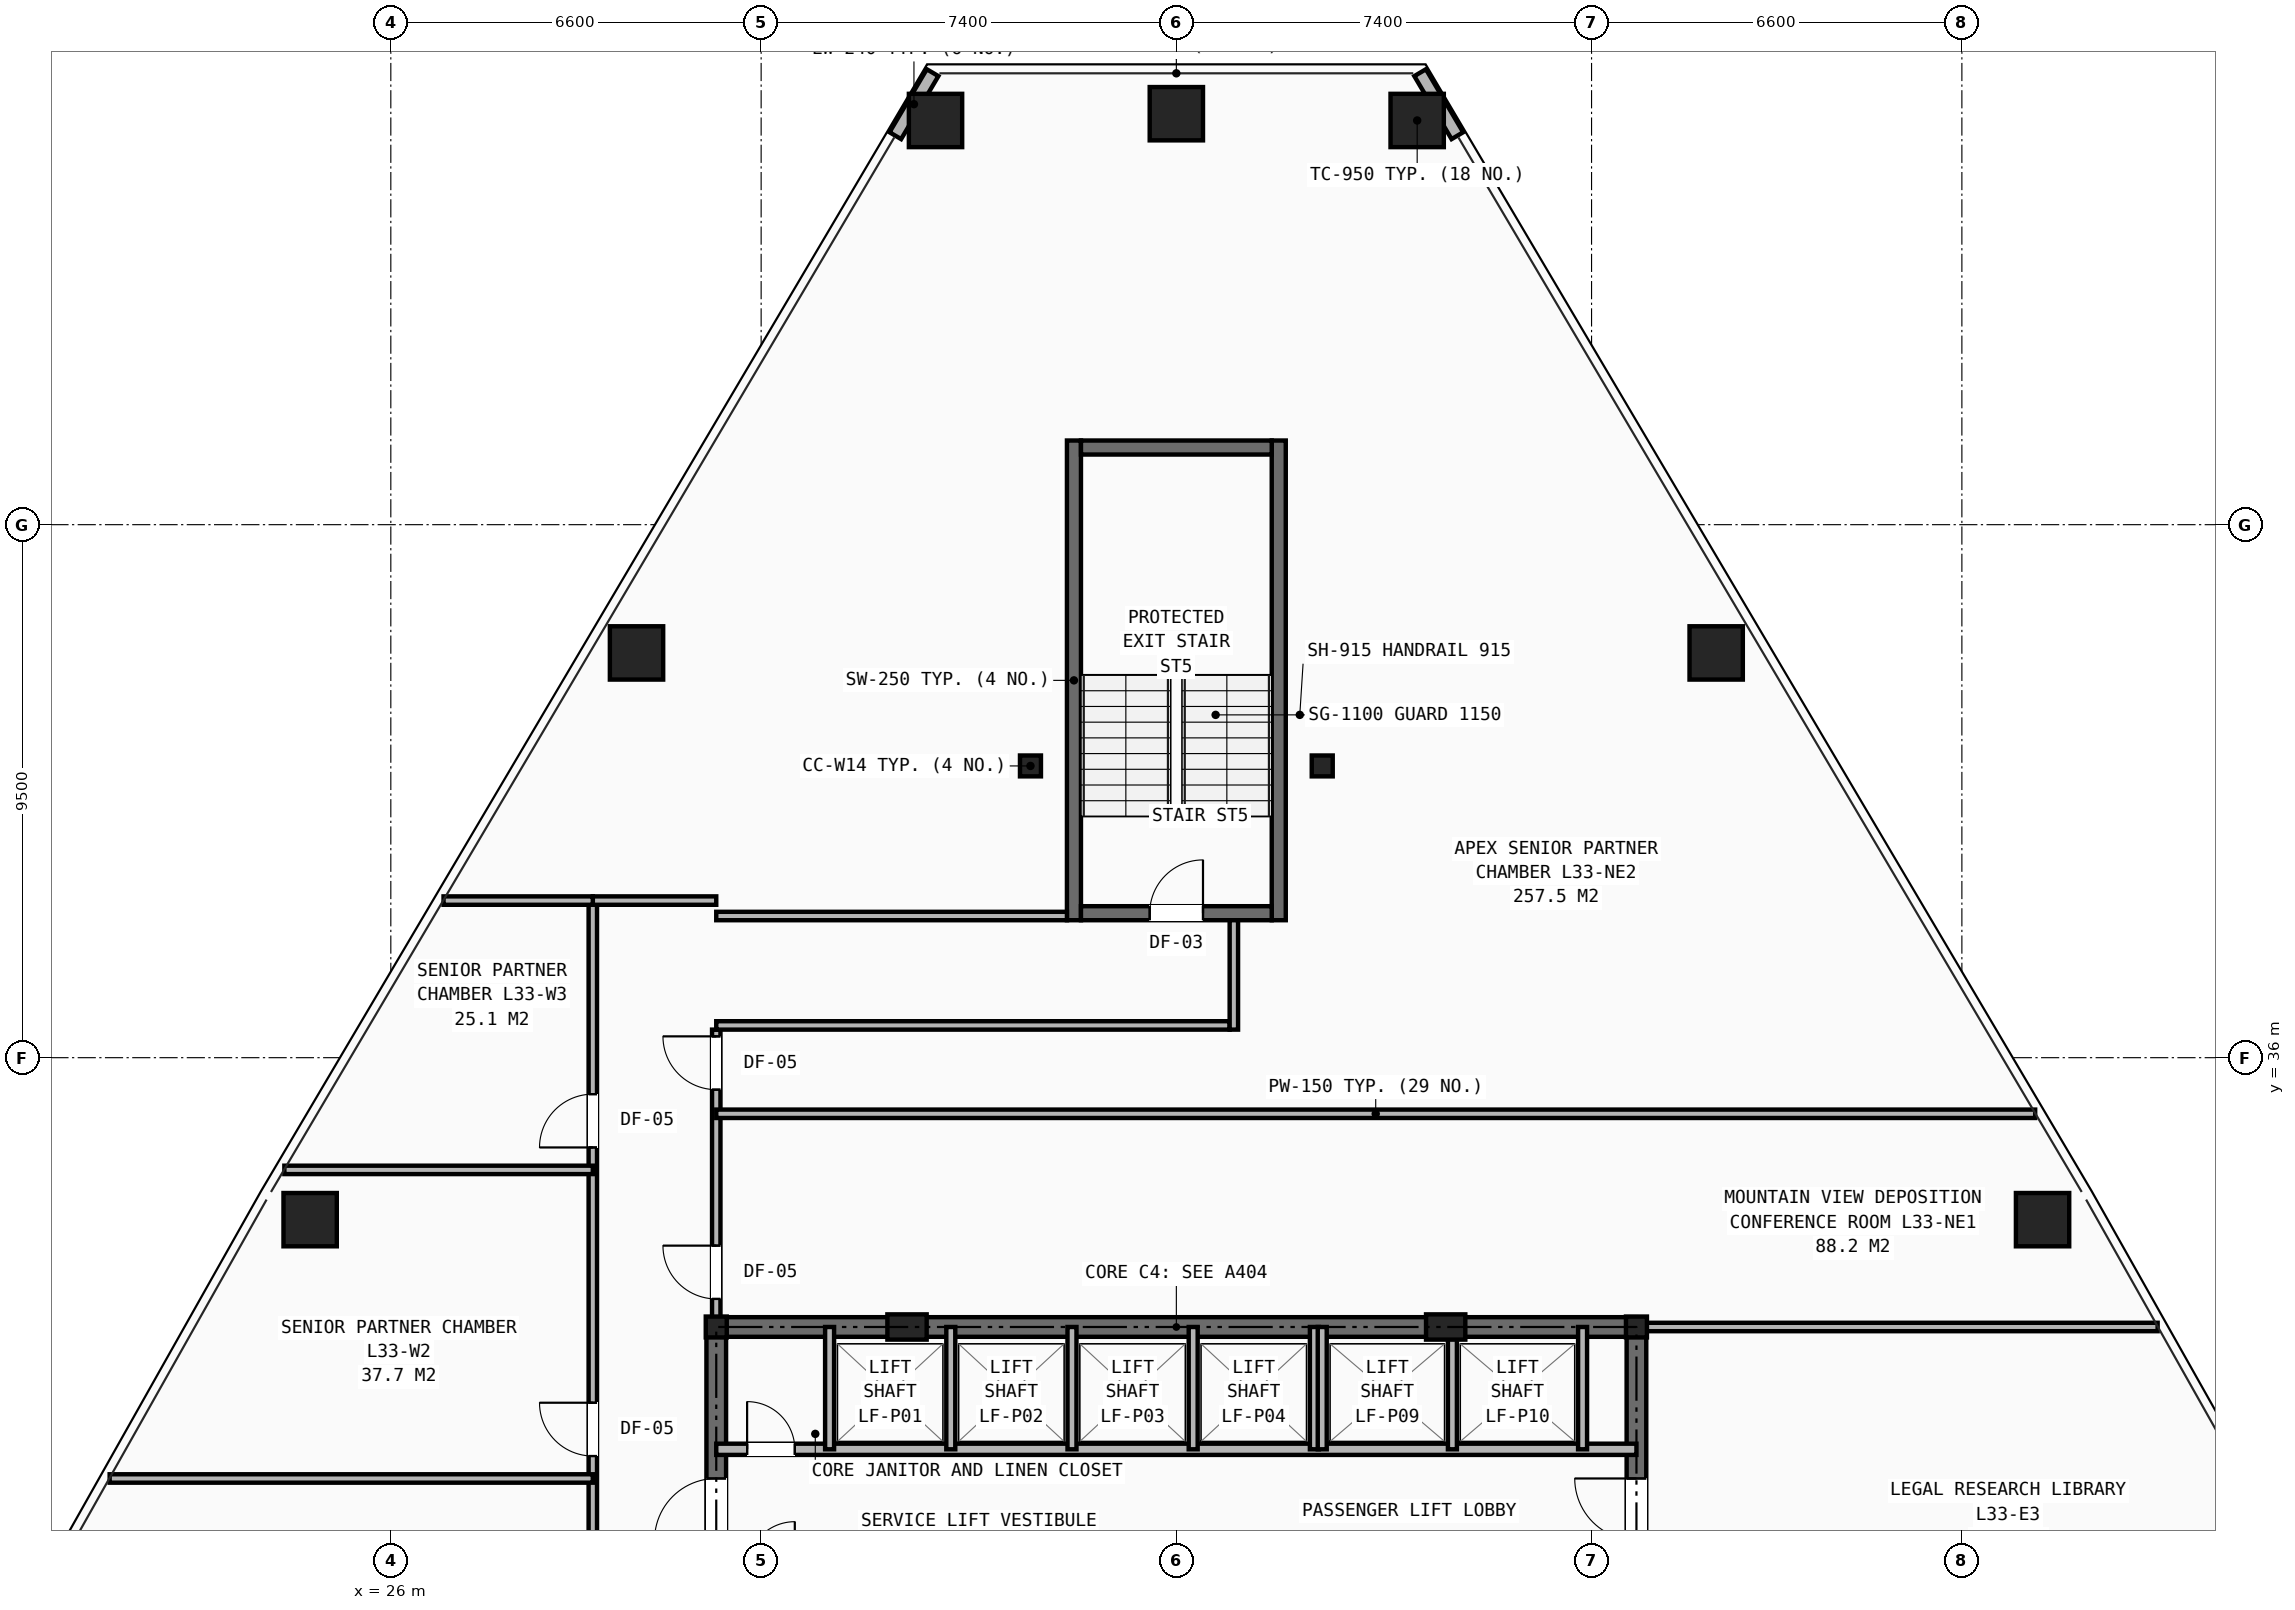
"""IFC4 building model, lengths in metres.
Left out: names, types, materials, properties, quantities, classifications, styles, units other than length and angle.
Written with IfcOpenShell. Run it as: python <this file> out.ifc"""

import sys

from ifc_helpers import new_model, si_unit, direction, frame, frame_2d, origin, origin_2d, place, context, subcontext, project, spatial, rectangle, hollow_rectangle, i_section, extrude, element, fill, save


model = new_model("IFC4")
c1 = context("Model", 3, precision=1e-05, world=origin(), true_north=direction((0.0, 1.0)))
c2 = subcontext(c1, "Body", "Model", "MODEL_VIEW")
j1 = project(units=[si_unit("LENGTHUNIT", "METRE"), si_unit("PLANEANGLEUNIT", "RADIAN")], contexts=[c1])
p1 = place(None, origin())
s1 = spatial("IfcSite", under=j1, at=p1, CompositionType="ELEMENT")
p2 = place(p1, origin())
s2 = spatial("IfcBuilding", under=s1, at=p2, CompositionType="ELEMENT")
p3 = place(p2, frame((0.0, 0.0, 116.0)))
s3 = spatial("IfcBuildingStorey", under=s2, at=p3, CompositionType="ELEMENT", Elevation=116.0)
for number, where, z_axis, x_axis in (
    (1, (31.8, 31.2, 0.0), (0.0, 0.0, 1.0), (1.0, 0.0, 0.0)),
    (2, (48.2, 31.2, 0.0), (0.0, 0.0, 1.0), (1.0, 0.0, 0.0)),
    (3, (37.4, 41.2, 0.0), (0.0, 0.0, 1.0), (1.0, 0.0, 0.0)),
    (4, (42.6, 41.2, 0.0), (0.0, 0.0, 1.0), (1.0, 0.0, 0.0)),
):
    element("IfcColumn", number, at=place(p3, frame(where, z_axis=z_axis, x_axis=x_axis)), inside=s3, PredefinedType="COLUMN", context=c2, shape_type="SweptSolid", body=[
        extrude(i_section(OverallWidth=0.374, OverallDepth=0.372, WebThickness=0.016, FlangeThickness=0.026, at=origin_2d()), origin(), (0.0, 0.0, 1.0), 3.45),
    ])
for number, where, z_axis, x_axis in (
    (5, (35.2, 31.2, 0.0), (0.0, 0.0, 1.0), (1.0, 0.0, 0.0)),
    (6, (44.8, 31.2, 0.0), (0.0, 0.0, 1.0), (1.0, 0.0, 0.0)),
):
    element("IfcColumn", number, at=place(p3, frame(where, z_axis=z_axis, x_axis=x_axis)), inside=s3, PredefinedType="PILASTER", context=c2, shape_type="SweptSolid", body=[
        extrude(rectangle(XDim=0.7, YDim=0.45, at=origin_2d()), origin(), (0.0, 0.0, 1.0), 3.45),
    ])
for number, where, z_axis, x_axis in (
    (7, (44.292, 52.704, 0.0), (0.0, 0.0, 1.0), (1.0, 0.0, 0.0)),
    (8, (40.0, 52.825, 0.0), (0.0, 0.0, 1.0), (1.0, 0.0, 0.0)),
    (9, (35.708, 52.704, 0.0), (0.0, 0.0, 1.0), (1.0, 0.0, 0.0)),
    (10, (30.379, 43.214, 0.0), (0.0, 0.0, 1.0), (1.0, 0.0, 0.0)),
    (11, (24.562, 33.113, 0.0), (0.0, 0.0, 1.0), (1.0, 0.0, 0.0)),
    (12, (55.438, 33.113, 0.0), (0.0, 0.0, 1.0), (1.0, 0.0, 0.0)),
    (13, (49.621, 43.214, 0.0), (0.0, 0.0, 1.0), (1.0, 0.0, 0.0)),
):
    element("IfcColumn", number, at=place(p3, frame(where, z_axis=z_axis, x_axis=x_axis)), inside=s3, PredefinedType="COLUMN", context=c2, shape_type="SweptSolid", body=[
        extrude(hollow_rectangle(XDim=0.95, YDim=0.95, WallThickness=0.065, at=origin_2d()), origin(), (0.0, 0.0, 1.0), 3.45),
    ])
for number, where, z_axis, x_axis in (
    (14, (35.655, 53.556, 0.0), (0.0, 0.0, 1.0), (-0.509, -0.861, 0.0)),
    (15, (45.009, 52.433, 0.0), (0.0, 0.0, 1.0), (-0.509, 0.861, 0.0)),
):
    element("IfcWall", number, at=place(p3, frame(where, z_axis=z_axis, x_axis=x_axis)), inside=s3, PredefinedType="SHEAR", context=c2, shape_type="SweptSolid", body=[
        extrude(rectangle(XDim=1.304, YDim=0.24, at=frame_2d((0.652, 0.0))), origin(), (0.0, 0.0, 1.0), 2.583),
    ])
p4 = place(p3, frame((31.8, 31.2, 0.0), z_axis=(0.0, 0.0, 1.0), x_axis=(1.0, 0.0, 0.0)))
e16 = element("IfcWall", 16, at=p4, inside=s3, PredefinedType="SHEAR", context=c2, shape_type="SweptSolid", body=[
    extrude(rectangle(XDim=16.4, YDim=0.35, at=frame_2d((8.2, 0.0))), origin(), (0.0, 0.0, 1.0), 3.21),
])
p5 = place(p3, frame((31.8, 16.4, 0.0), z_axis=(0.0, 0.0, 1.0), x_axis=(0.0, 1.0, 0.0)))
e17 = element("IfcWall", 17, at=p5, inside=s3, PredefinedType="SHEAR", context=c2, shape_type="SweptSolid", body=[
    extrude(rectangle(XDim=14.8, YDim=0.35, at=frame_2d((7.4, 0.0))), origin(), (0.0, 0.0, 1.0), 3.21),
])
p6 = place(p5, frame((11.0, 0.0, 0.0)))
e18 = element("IfcOpeningElement", 18, at=p6, cuts=e17, PredefinedType="OPENING", context=c2, shape_type="SweptSolid", body=[
    extrude(rectangle(XDim=1.1, YDim=2.15, at=frame_2d((0.55, 1.075))), frame((0.0, 0.185, 0.0), z_axis=(0.0, -1.0, 0.0), x_axis=(1.0, 0.0, 0.0)), (0.0, 0.0, 1.0), 0.37),
])
p7 = place(p3, frame((48.2, 16.4, 0.0), z_axis=(0.0, 0.0, 1.0), x_axis=(0.0, 1.0, 0.0)))
e19 = element("IfcWall", 19, at=p7, inside=s3, PredefinedType="SHEAR", context=c2, shape_type="SweptSolid", body=[
    extrude(rectangle(XDim=14.8, YDim=0.35, at=frame_2d((7.4, 0.0))), origin(), (0.0, 0.0, 1.0), 3.21),
])
p8 = place(p7, frame((11.0, 0.0, 0.0)))
e20 = element("IfcOpeningElement", 20, at=p8, cuts=e19, PredefinedType="OPENING", context=c2, shape_type="SweptSolid", body=[
    extrude(rectangle(XDim=1.1, YDim=2.15, at=frame_2d((0.55, 1.075))), frame((0.0, 0.185, 0.0), z_axis=(0.0, -1.0, 0.0), x_axis=(1.0, 0.0, 0.0)), (0.0, 0.0, 1.0), 0.37),
])
p9 = place(p3, frame((31.8, 29.02, 0.0), z_axis=(0.0, 0.0, 1.0), x_axis=(1.0, 0.0, 0.0)))
e21 = element("IfcWall", 21, at=p9, inside=s3, PredefinedType="SOLIDWALL", context=c2, shape_type="SweptSolid", body=[
    extrude(rectangle(XDim=16.4, YDim=0.2, at=frame_2d((8.2, 0.0))), origin(), (0.0, 0.0, 1.0), 2.661),
])
p10 = place(p9, frame((0.55, 0.0, 0.0)))
e22 = element("IfcOpeningElement", 22, at=p10, cuts=e21, PredefinedType="OPENING", context=c2, shape_type="SweptSolid", body=[
    extrude(rectangle(XDim=0.85, YDim=2.05, at=frame_2d((0.425, 1.025))), frame((0.0, 0.11, 0.0), z_axis=(0.0, -1.0, 0.0), x_axis=(1.0, 0.0, 0.0)), (0.0, 0.0, 1.0), 0.22),
])
for number, where, z_axis, x_axis in (
    (23, (33.82, 29.02, 0.0), (0.0, 0.0, 1.0), (0.0, 1.0, 0.0)),
    (24, (35.98, 29.02, 0.0), (0.0, 0.0, 1.0), (0.0, 1.0, 0.0)),
    (25, (38.14, 29.02, 0.0), (0.0, 0.0, 1.0), (0.0, 1.0, 0.0)),
    (26, (40.3, 29.02, 0.0), (0.0, 0.0, 1.0), (0.0, 1.0, 0.0)),
    (27, (42.46, 29.02, 0.0), (0.0, 0.0, 1.0), (0.0, 1.0, 0.0)),
    (28, (42.6, 29.02, 0.0), (0.0, 0.0, 1.0), (0.0, 1.0, 0.0)),
    (29, (44.92, 29.02, 0.0), (0.0, 0.0, 1.0), (0.0, 1.0, 0.0)),
    (30, (47.24, 29.02, 0.0), (0.0, 0.0, 1.0), (0.0, 1.0, 0.0)),
):
    element("IfcWall", number, at=place(p3, frame(where, z_axis=z_axis, x_axis=x_axis)), inside=s3, PredefinedType="SOLIDWALL", context=c2, shape_type="SweptSolid", body=[
        extrude(rectangle(XDim=2.18, YDim=0.16, at=frame_2d((1.09, 0.0))), origin(), (0.0, 0.0, 1.0), 2.661),
    ])
p11 = place(p3, frame((29.6, 24.9, 0.0), z_axis=(0.0, 0.0, 1.0), x_axis=(0.0, 1.0, 0.0)))
e31 = element("IfcWall", 31, at=p11, inside=s3, PredefinedType="PARTITIONING", context=c2, shape_type="SweptSolid", body=[
    extrude(rectangle(XDim=13.9, YDim=0.15, at=frame_2d((6.95, 0.0))), origin(), (0.0, 0.0, 1.0), 2.225),
])
p12 = place(p11, frame((0.4, 0.0, 0.0)))
e32 = element("IfcOpeningElement", 32, at=p12, cuts=e31, PredefinedType="OPENING", context=c2, shape_type="SweptSolid", body=[
    extrude(rectangle(XDim=0.95, YDim=2.1, at=frame_2d((0.475, 1.05))), frame((0.0, 0.085, 0.0), z_axis=(0.0, -1.0, 0.0), x_axis=(1.0, 0.0, 0.0)), (0.0, 0.0, 1.0), 0.17),
])
p13 = place(p11, frame((4.0, 0.0, 0.0)))
e33 = element("IfcOpeningElement", 33, at=p13, cuts=e31, PredefinedType="OPENING", context=c2, shape_type="SweptSolid", body=[
    extrude(rectangle(XDim=0.95, YDim=2.1, at=frame_2d((0.475, 1.05))), frame((0.0, 0.085, 0.0), z_axis=(0.0, -1.0, 0.0), x_axis=(1.0, 0.0, 0.0)), (0.0, 0.0, 1.0), 0.17),
])
p14 = place(p11, frame((9.5, 0.0, 0.0)))
e34 = element("IfcOpeningElement", 34, at=p14, cuts=e31, PredefinedType="OPENING", context=c2, shape_type="SweptSolid", body=[
    extrude(rectangle(XDim=0.95, YDim=2.1, at=frame_2d((0.475, 1.05))), frame((0.0, 0.085, 0.0), z_axis=(0.0, -1.0, 0.0), x_axis=(1.0, 0.0, 0.0)), (0.0, 0.0, 1.0), 0.17),
])
p15 = place(p3, frame((31.8, 31.2, 0.0), z_axis=(0.0, 0.0, 1.0), x_axis=(0.0, 1.0, 0.0)))
e35 = element("IfcWall", 35, at=p15, inside=s3, PredefinedType="PARTITIONING", context=c2, shape_type="SweptSolid", body=[
    extrude(rectangle(XDim=5.3, YDim=0.15, at=frame_2d((2.65, 0.0))), origin(), (0.0, 0.0, 1.0), 2.225),
])
p16 = place(p15, frame((0.5, 0.0, 0.0)))
e36 = element("IfcOpeningElement", 36, at=p16, cuts=e35, PredefinedType="OPENING", context=c2, shape_type="SweptSolid", body=[
    extrude(rectangle(XDim=0.95, YDim=2.1, at=frame_2d((0.475, 1.05))), frame((0.0, 0.085, 0.0), z_axis=(0.0, -1.0, 0.0), x_axis=(1.0, 0.0, 0.0)), (0.0, 0.0, 1.0), 0.17),
])
p17 = place(p15, frame((4.23, 0.0, 0.0)))
e37 = element("IfcOpeningElement", 37, at=p17, cuts=e35, PredefinedType="OPENING", context=c2, shape_type="SweptSolid", body=[
    extrude(rectangle(XDim=0.95, YDim=2.1, at=frame_2d((0.475, 1.05))), frame((0.0, 0.085, 0.0), z_axis=(0.0, -1.0, 0.0), x_axis=(1.0, 0.0, 0.0)), (0.0, 0.0, 1.0), 0.17),
])
p18 = place(p3, frame((29.6, 38.8, 0.0), z_axis=(0.0, 0.0, 1.0), x_axis=(1.0, 0.0, 0.0)))
e38 = element("IfcWall", 38, at=p18, inside=s3, PredefinedType="PARTITIONING", context=c2, shape_type="SweptSolid", body=[
    extrude(rectangle(XDim=2.2, YDim=0.15, at=frame_2d((1.1, 0.0))), origin(), (0.0, 0.0, 1.0), 2.743),
])
p19 = place(p3, frame((26.939, 38.8, 0.0), z_axis=(0.0, 0.0, 1.0), x_axis=(1.0, 0.0, 0.0)))
e39 = element("IfcWall", 39, at=p19, inside=s3, PredefinedType="PARTITIONING", context=c2, shape_type="SweptSolid", body=[
    extrude(rectangle(XDim=2.661, YDim=0.15, at=frame_2d((1.33, 0.0))), origin(), (0.0, 0.0, 1.0), 2.589),
])
p20 = place(p3, frame((20.989, 28.5, 0.0), z_axis=(0.0, 0.0, 1.0), x_axis=(1.0, 0.0, 0.0)))
e40 = element("IfcWall", 40, at=p20, inside=s3, PredefinedType="PARTITIONING", context=c2, shape_type="SweptSolid", body=[
    extrude(rectangle(XDim=8.611, YDim=0.15, at=frame_2d((4.306, 0.0))), origin(), (0.0, 0.0, 1.0), 2.589),
])
p21 = place(p3, frame((24.103, 34.0, 0.0), z_axis=(0.0, 0.0, 1.0), x_axis=(1.0, 0.0, 0.0)))
e41 = element("IfcWall", 41, at=p21, inside=s3, PredefinedType="PARTITIONING", context=c2, shape_type="SweptSolid", body=[
    extrude(rectangle(XDim=5.498, YDim=0.15, at=frame_2d((2.749, 0.0))), origin(), (0.0, 0.0, 1.0), 2.589),
])
p22 = place(p3, frame((48.2, 31.2, 0.0), z_axis=(0.0, 0.0, 1.0), x_axis=(1.0, 0.0, 0.0)))
e42 = element("IfcWall", 42, at=p22, inside=s3, PredefinedType="PARTITIONING", context=c2, shape_type="SweptSolid", body=[
    extrude(rectangle(XDim=9.289, YDim=0.15, at=frame_2d((4.645, 0.0))), origin(), (0.0, 0.0, 1.0), 2.225),
])
p23 = place(p3, frame((31.8, 35.0, 0.0), z_axis=(0.0, 0.0, 1.0), x_axis=(1.0, 0.0, 0.0)))
e43 = element("IfcWall", 43, at=p23, inside=s3, PredefinedType="PARTITIONING", context=c2, shape_type="SweptSolid", body=[
    extrude(rectangle(XDim=23.506, YDim=0.15, at=frame_2d((11.753, 0.0))), origin(), (0.0, 0.0, 1.0), 2.589),
])
for number, where, z_axis, x_axis in (
    (44, (38.175, 38.45, 0.0), (0.0, 0.0, 1.0), (0.0, 1.0, 0.0)),
    (45, (41.825, 38.45, 0.0), (0.0, 0.0, 1.0), (0.0, 1.0, 0.0)),
):
    element("IfcWall", number, at=place(p3, frame(where, z_axis=z_axis, x_axis=x_axis)), inside=s3, PredefinedType="SHEAR", context=c2, shape_type="SweptSolid", body=[
        extrude(rectangle(XDim=8.55, YDim=0.25, at=frame_2d((4.275, 0.0))), origin(), (0.0, 0.0, 1.0), 3.21),
    ])
p24 = place(p3, frame((38.3, 38.575, 0.0), z_axis=(0.0, 0.0, 1.0), x_axis=(1.0, 0.0, 0.0)))
e46 = element("IfcWall", 46, at=p24, inside=s3, PredefinedType="SHEAR", context=c2, shape_type="SweptSolid", body=[
    extrude(rectangle(XDim=3.4, YDim=0.25, at=frame_2d((1.7, 0.0))), origin(), (0.0, 0.0, 1.0), 3.21),
])
p25 = place(p24, frame((1.225, 0.0, 0.0)))
e47 = element("IfcOpeningElement", 47, at=p25, cuts=e46, PredefinedType="OPENING", context=c2, shape_type="SweptSolid", body=[
    extrude(rectangle(XDim=0.95, YDim=2.1, at=frame_2d((0.475, 1.05))), frame((0.0, 0.135, 0.0), z_axis=(0.0, -1.0, 0.0), x_axis=(1.0, 0.0, 0.0)), (0.0, 0.0, 1.0), 0.27),
])
p26 = place(p3, frame((38.3, 46.875, 0.0), z_axis=(0.0, 0.0, 1.0), x_axis=(1.0, 0.0, 0.0)))
e48 = element("IfcWall", 48, at=p26, inside=s3, PredefinedType="SHEAR", context=c2, shape_type="SweptSolid", body=[
    extrude(rectangle(XDim=3.4, YDim=0.25, at=frame_2d((1.7, 0.0))), origin(), (0.0, 0.0, 1.0), 3.21),
])
p27 = place(p3, frame((31.8, 36.575, 0.0), z_axis=(0.0, 0.0, 1.0), x_axis=(1.0, 0.0, 0.0)))
e49 = element("IfcWall", 49, at=p27, inside=s3, PredefinedType="PARTITIONING", context=c2, shape_type="SweptSolid", body=[
    extrude(rectangle(XDim=9.15, YDim=0.15, at=frame_2d((4.575, 0.0))), origin(), (0.0, 0.0, 1.0), 3.21),
])
p28 = place(p3, frame((31.8, 38.525, 0.0), z_axis=(0.0, 0.0, 1.0), x_axis=(1.0, 0.0, 0.0)))
e50 = element("IfcWall", 50, at=p28, inside=s3, PredefinedType="PARTITIONING", context=c2, shape_type="SweptSolid", body=[
    extrude(rectangle(XDim=6.25, YDim=0.15, at=frame_2d((3.125, 0.0))), origin(), (0.0, 0.0, 1.0), 2.743),
])
p29 = place(p3, frame((41.025, 36.5, 0.0), z_axis=(0.0, 0.0, 1.0), x_axis=(0.0, 1.0, 0.0)))
e51 = element("IfcWall", 51, at=p29, inside=s3, PredefinedType="PARTITIONING", context=c2, shape_type="SweptSolid", body=[
    extrude(rectangle(XDim=1.95, YDim=0.15, at=frame_2d((0.975, 0.0))), origin(), (0.0, 0.0, 1.0), 3.21),
])
p30 = place(p10, origin())
e52 = element("IfcDoor", 52, at=p30, inside=s3, OperationType="SINGLE_SWING_LEFT", PredefinedType="DOOR", context=c2, shape_type="SweptSolid", body=[
    extrude(rectangle(XDim=0.85, YDim=2.05, at=frame_2d((0.425, 1.025))), frame((0.0, 0.025, 0.0), z_axis=(0.0, -1.0, 0.0), x_axis=(1.0, 0.0, 0.0)), (0.0, 0.0, 1.0), 0.05),
])
fill(e22, e52)
p31 = place(p6, origin())
e53 = element("IfcDoor", 53, at=p31, inside=s3, OperationType="SINGLE_SWING_LEFT", PredefinedType="DOOR", context=c2, shape_type="SweptSolid", body=[
    extrude(rectangle(XDim=1.1, YDim=2.15, at=frame_2d((0.55, 1.075))), frame((0.0, 0.025, 0.0), z_axis=(0.0, -1.0, 0.0), x_axis=(1.0, 0.0, 0.0)), (0.0, 0.0, 1.0), 0.05),
])
fill(e18, e53)
p32 = place(p8, origin())
e54 = element("IfcDoor", 54, at=p32, inside=s3, OperationType="SINGLE_SWING_RIGHT", PredefinedType="DOOR", context=c2, shape_type="SweptSolid", body=[
    extrude(rectangle(XDim=1.1, YDim=2.15, at=frame_2d((0.55, 1.075))), frame((0.0, 0.025, 0.0), z_axis=(0.0, -1.0, 0.0), x_axis=(1.0, 0.0, 0.0)), (0.0, 0.0, 1.0), 0.05),
])
fill(e20, e54)
p33 = place(p13, origin())
e55 = element("IfcDoor", 55, at=p33, inside=s3, OperationType="SINGLE_SWING_RIGHT", PredefinedType="DOOR", context=c2, shape_type="SweptSolid", body=[
    extrude(rectangle(XDim=0.95, YDim=2.1, at=frame_2d((0.475, 1.05))), frame((0.0, 0.025, 0.0), z_axis=(0.0, -1.0, 0.0), x_axis=(1.0, 0.0, 0.0)), (0.0, 0.0, 1.0), 0.05),
])
fill(e33, e55)
p34 = place(p14, origin())
e56 = element("IfcDoor", 56, at=p34, inside=s3, OperationType="SINGLE_SWING_LEFT", PredefinedType="DOOR", context=c2, shape_type="SweptSolid", body=[
    extrude(rectangle(XDim=0.95, YDim=2.1, at=frame_2d((0.475, 1.05))), frame((0.0, 0.025, 0.0), z_axis=(0.0, -1.0, 0.0), x_axis=(1.0, 0.0, 0.0)), (0.0, 0.0, 1.0), 0.05),
])
fill(e34, e56)
p35 = place(p16, origin())
e57 = element("IfcDoor", 57, at=p35, inside=s3, OperationType="SINGLE_SWING_RIGHT", PredefinedType="DOOR", context=c2, shape_type="SweptSolid", body=[
    extrude(rectangle(XDim=0.95, YDim=2.1, at=frame_2d((0.475, 1.05))), frame((0.0, 0.025, 0.0), z_axis=(0.0, -1.0, 0.0), x_axis=(1.0, 0.0, 0.0)), (0.0, 0.0, 1.0), 0.05),
])
fill(e36, e57)
p36 = place(p17, origin())
e58 = element("IfcDoor", 58, at=p36, inside=s3, OperationType="SINGLE_SWING_RIGHT", PredefinedType="DOOR", context=c2, shape_type="SweptSolid", body=[
    extrude(rectangle(XDim=0.95, YDim=2.1, at=frame_2d((0.475, 1.05))), frame((0.0, 0.025, 0.0), z_axis=(0.0, -1.0, 0.0), x_axis=(1.0, 0.0, 0.0)), (0.0, 0.0, 1.0), 0.05),
])
fill(e37, e58)
p37 = place(p25, origin())
e59 = element("IfcDoor", 59, at=p37, inside=s3, OperationType="SINGLE_SWING_RIGHT", PredefinedType="DOOR", context=c2, shape_type="SweptSolid", body=[
    extrude(rectangle(XDim=0.95, YDim=2.1, at=frame_2d((0.475, 1.05))), frame((0.0, 0.025, 0.0), z_axis=(0.0, -1.0, 0.0), x_axis=(1.0, 0.0, 0.0)), (0.0, 0.0, 1.0), 0.05),
])
fill(e47, e59)
save(model, sys.argv[1])
